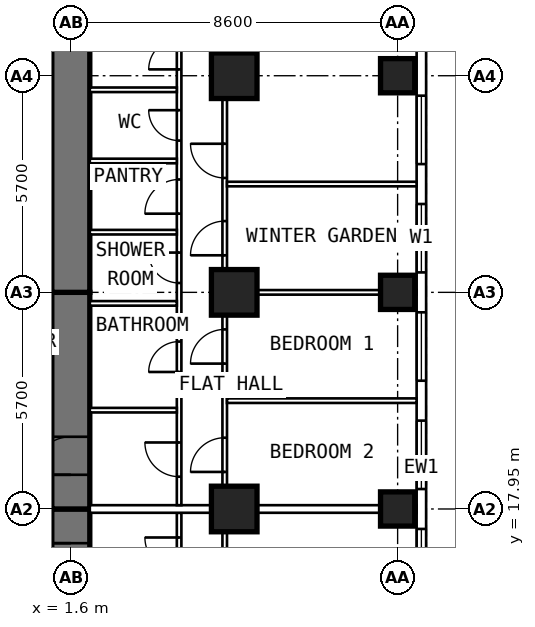
"""IFC4 building model, lengths in metres.
Left out: names, types, materials, properties, quantities, classifications, styles, units other than length and angle.
Written with IfcOpenShell. Run it as: python <this file> out.ifc"""

import sys

from ifc_helpers import new_model, si_unit, direction, frame, frame_2d, origin, origin_2d, place, context, subcontext, project, spatial, rectangle, extrude, element, fill, save


model = new_model("IFC4")
c1 = context("Model", 3, precision=1e-05, world=origin(), true_north=direction((0.0, 1.0)))
c2 = subcontext(c1, "Body", "Model", "MODEL_VIEW")
j1 = project(units=[si_unit("LENGTHUNIT", "METRE"), si_unit("PLANEANGLEUNIT", "RADIAN")], contexts=[c1])
p1 = place(None, origin())
s1 = spatial("IfcSite", under=j1, at=p1, CompositionType="ELEMENT")
p2 = place(p1, origin())
s2 = spatial("IfcBuilding", under=s1, at=p2, CompositionType="ELEMENT")
p3 = place(p2, frame((0.0, 0.0, 102.4)))
s3 = spatial("IfcBuildingStorey", under=s2, at=p3, CompositionType="ELEMENT", Elevation=102.4)
for number, where, z_axis, x_axis in (
    (1, (10.2, 17.95, 0.0), (0.0, 0.0, 1.0), (0.0, 1.0, 0.0)),
    (2, (10.2, 23.65, 0.0), (0.0, 0.0, 1.0), (0.0, 1.0, 0.0)),
    (3, (10.2, 29.35, 0.0), (0.0, 0.0, 1.0), (0.0, 1.0, 0.0)),
):
    element("IfcColumn", number, at=place(p3, frame(where, z_axis=z_axis, x_axis=x_axis)), inside=s3, PredefinedType="COLUMN", context=c2, shape_type="SweptSolid", body=[
        extrude(rectangle(XDim=0.9, YDim=0.9, at=origin_2d()), origin(), (0.0, 0.0, 1.0), 3.6),
    ])
for number, where, z_axis, x_axis in (
    (4, (5.9, 17.95, 0.0), (0.0, 0.0, 1.0), (0.0, 1.0, 0.0)),
    (5, (5.9, 23.65, 0.0), (0.0, 0.0, 1.0), (0.0, 1.0, 0.0)),
    (6, (5.9, 29.35, 0.0), (0.0, 0.0, 1.0), (0.0, 1.0, 0.0)),
):
    element("IfcColumn", number, at=place(p3, frame(where, z_axis=z_axis, x_axis=x_axis)), inside=s3, PredefinedType="COLUMN", context=c2, shape_type="SweptSolid", body=[
        extrude(rectangle(XDim=1.2, YDim=1.2, at=origin_2d()), origin(), (0.0, 0.0, 1.0), 3.6),
    ])
p4 = place(p3, frame((1.6, 9.6, 0.0), z_axis=(0.0, 0.0, 1.0), x_axis=(0.0, 1.0, 0.0)))
e7 = element("IfcWall", 7, at=p4, inside=s3, PredefinedType="SHEAR", context=c2, shape_type="SweptSolid", body=[
    extrude(rectangle(XDim=8.35, YDim=1.0, at=frame_2d((4.175, 0.0))), origin(), (0.0, 0.0, 1.0), 3.6),
])
p5 = place(p4, frame((6.45, 0.0, 0.0)))
e8 = element("IfcOpeningElement", 8, at=p5, cuts=e7, PredefinedType="OPENING", context=c2, shape_type="SweptSolid", body=[
    extrude(rectangle(XDim=1.0, YDim=2.1, at=frame_2d((0.5, 1.05))), frame((0.0, 0.512, 0.0), z_axis=(0.0, -1.0, 0.0), x_axis=(1.0, 0.0, 0.0)), (0.0, 0.0, 1.0), 1.024),
])
p6 = place(p3, frame((1.6, 17.95, 0.0), z_axis=(0.0, 0.0, 1.0), x_axis=(0.0, 1.0, 0.0)))
e9 = element("IfcWall", 9, at=p6, inside=s3, PredefinedType="SHEAR", context=c2, shape_type="SweptSolid", body=[
    extrude(rectangle(XDim=5.7, YDim=1.0, at=frame_2d((2.85, 0.0))), origin(), (0.0, 0.0, 1.0), 3.6),
])
p7 = place(p6, frame((0.9, 0.0, 0.0)))
e10 = element("IfcOpeningElement", 10, at=p7, cuts=e9, PredefinedType="OPENING", context=c2, shape_type="SweptSolid", body=[
    extrude(rectangle(XDim=1.0, YDim=2.1, at=frame_2d((0.5, 1.05))), frame((0.0, 0.512, 0.0), z_axis=(0.0, -1.0, 0.0), x_axis=(1.0, 0.0, 0.0)), (0.0, 0.0, 1.0), 1.024),
])
p8 = place(p3, frame((1.6, 23.65, 0.0), z_axis=(0.0, 0.0, 1.0), x_axis=(0.0, 1.0, 0.0)))
e11 = element("IfcWall", 11, at=p8, inside=s3, PredefinedType="SHEAR", context=c2, shape_type="SweptSolid", body=[
    extrude(rectangle(XDim=10.745, YDim=1.0, at=frame_2d((5.373, 0.0))), origin(), (0.0, 0.0, 1.0), 3.6),
])
p9 = place(p3, frame((10.825, 6.409, 0.0), z_axis=(0.0, 0.0, 1.0), x_axis=(0.0, 1.0, 0.0)))
e12 = element("IfcWall", 12, at=p9, inside=s3, PredefinedType="SOLIDWALL", context=c2, shape_type="SweptSolid", body=[
    extrude(rectangle(XDim=25.226, YDim=0.25, at=frame_2d((12.613, 0.0))), origin(), (0.0, 0.0, 1.0), 3.35),
])
p10 = place(p9, frame((0.666, 0.0, 0.8)))
e13 = element("IfcOpeningElement", 13, at=p10, cuts=e12, PredefinedType="OPENING", context=c2, shape_type="SweptSolid", body=[
    extrude(rectangle(XDim=1.8, YDim=1.8, at=frame_2d((0.9, 0.9))), frame((0.0, 0.137, 0.0), z_axis=(0.0, -1.0, 0.0), x_axis=(1.0, 0.0, 0.0)), (0.0, 0.0, 1.0), 0.274),
])
p11 = place(p9, frame((3.516, 0.0, 0.8)))
e14 = element("IfcOpeningElement", 14, at=p11, cuts=e12, PredefinedType="OPENING", context=c2, shape_type="SweptSolid", body=[
    extrude(rectangle(XDim=1.8, YDim=1.8, at=frame_2d((0.9, 0.9))), frame((0.0, 0.137, 0.0), z_axis=(0.0, -1.0, 0.0), x_axis=(1.0, 0.0, 0.0)), (0.0, 0.0, 1.0), 0.274),
])
p12 = place(p9, frame((6.366, 0.0, 0.8)))
e15 = element("IfcOpeningElement", 15, at=p12, cuts=e12, PredefinedType="OPENING", context=c2, shape_type="SweptSolid", body=[
    extrude(rectangle(XDim=1.8, YDim=1.8, at=frame_2d((0.9, 0.9))), frame((0.0, 0.137, 0.0), z_axis=(0.0, -1.0, 0.0), x_axis=(1.0, 0.0, 0.0)), (0.0, 0.0, 1.0), 0.274),
])
p13 = place(p9, frame((9.216, 0.0, 0.8)))
e16 = element("IfcOpeningElement", 16, at=p13, cuts=e12, PredefinedType="OPENING", context=c2, shape_type="SweptSolid", body=[
    extrude(rectangle(XDim=1.8, YDim=1.8, at=frame_2d((0.9, 0.9))), frame((0.0, 0.137, 0.0), z_axis=(0.0, -1.0, 0.0), x_axis=(1.0, 0.0, 0.0)), (0.0, 0.0, 1.0), 0.274),
])
p14 = place(p9, frame((12.066, 0.0, 0.8)))
e17 = element("IfcOpeningElement", 17, at=p14, cuts=e12, PredefinedType="OPENING", context=c2, shape_type="SweptSolid", body=[
    extrude(rectangle(XDim=1.8, YDim=1.8, at=frame_2d((0.9, 0.9))), frame((0.0, 0.137, 0.0), z_axis=(0.0, -1.0, 0.0), x_axis=(1.0, 0.0, 0.0)), (0.0, 0.0, 1.0), 0.274),
])
p15 = place(p9, frame((14.916, 0.0, 0.8)))
e18 = element("IfcOpeningElement", 18, at=p15, cuts=e12, PredefinedType="OPENING", context=c2, shape_type="SweptSolid", body=[
    extrude(rectangle(XDim=1.8, YDim=1.8, at=frame_2d((0.9, 0.9))), frame((0.0, 0.137, 0.0), z_axis=(0.0, -1.0, 0.0), x_axis=(1.0, 0.0, 0.0)), (0.0, 0.0, 1.0), 0.274),
])
p16 = place(p9, frame((17.766, 0.0, 0.8)))
e19 = element("IfcOpeningElement", 19, at=p16, cuts=e12, PredefinedType="OPENING", context=c2, shape_type="SweptSolid", body=[
    extrude(rectangle(XDim=1.8, YDim=1.8, at=frame_2d((0.9, 0.9))), frame((0.0, 0.137, 0.0), z_axis=(0.0, -1.0, 0.0), x_axis=(1.0, 0.0, 0.0)), (0.0, 0.0, 1.0), 0.274),
])
p17 = place(p9, frame((20.616, 0.0, 0.8)))
e20 = element("IfcOpeningElement", 20, at=p17, cuts=e12, PredefinedType="OPENING", context=c2, shape_type="SweptSolid", body=[
    extrude(rectangle(XDim=1.8, YDim=1.8, at=frame_2d((0.9, 0.9))), frame((0.0, 0.137, 0.0), z_axis=(0.0, -1.0, 0.0), x_axis=(1.0, 0.0, 0.0)), (0.0, 0.0, 1.0), 0.274),
])
p18 = place(p3, frame((4.45, 10.1, 0.0), z_axis=(0.0, 0.0, 1.0), x_axis=(0.0, 1.0, 0.0)))
e21 = element("IfcWall", 21, at=p18, inside=s3, PredefinedType="PARTITIONING", context=c2, shape_type="SweptSolid", body=[
    extrude(rectangle(XDim=7.75, YDim=0.12, at=frame_2d((3.875, 0.0))), origin(), (0.0, 0.0, 1.0), 3.35),
])
p19 = place(p18, frame((0.56, 0.0, 0.0)))
e22 = element("IfcOpeningElement", 22, at=p19, cuts=e21, PredefinedType="OPENING", context=c2, shape_type="SweptSolid", body=[
    extrude(rectangle(XDim=0.9, YDim=2.1, at=frame_2d((0.45, 1.05))), frame((0.0, 0.072, 0.0), z_axis=(0.0, -1.0, 0.0), x_axis=(1.0, 0.0, 0.0)), (0.0, 0.0, 1.0), 0.144),
])
p20 = place(p18, frame((3.385, 0.0, 0.0)))
e23 = element("IfcOpeningElement", 23, at=p20, cuts=e21, PredefinedType="OPENING", context=c2, shape_type="SweptSolid", body=[
    extrude(rectangle(XDim=0.8, YDim=2.1, at=frame_2d((0.4, 1.05))), frame((0.0, 0.072, 0.0), z_axis=(0.0, -1.0, 0.0), x_axis=(1.0, 0.0, 0.0)), (0.0, 0.0, 1.0), 0.144),
])
p21 = place(p18, frame((6.2, 0.0, 0.0)))
e24 = element("IfcOpeningElement", 24, at=p21, cuts=e21, PredefinedType="OPENING", context=c2, shape_type="SweptSolid", body=[
    extrude(rectangle(XDim=0.9, YDim=2.1, at=frame_2d((0.45, 1.05))), frame((0.0, 0.072, 0.0), z_axis=(0.0, -1.0, 0.0), x_axis=(1.0, 0.0, 0.0)), (0.0, 0.0, 1.0), 0.144),
])
p22 = place(p3, frame((5.65, 9.6, 0.0), z_axis=(0.0, 0.0, 1.0), x_axis=(0.0, 1.0, 0.0)))
e25 = element("IfcWall", 25, at=p22, inside=s3, PredefinedType="PARTITIONING", context=c2, shape_type="SweptSolid", body=[
    extrude(rectangle(XDim=8.1, YDim=0.12, at=frame_2d((4.05, 0.0))), origin(), (0.0, 0.0, 1.0), 3.35),
])
p23 = place(p22, frame((5.05, 0.0, 0.0)))
e26 = element("IfcOpeningElement", 26, at=p23, cuts=e25, PredefinedType="OPENING", context=c2, shape_type="SweptSolid", body=[
    extrude(rectangle(XDim=0.9, YDim=2.1, at=frame_2d((0.45, 1.05))), frame((0.0, 0.072, 0.0), z_axis=(0.0, -1.0, 0.0), x_axis=(1.0, 0.0, 0.0)), (0.0, 0.0, 1.0), 0.144),
])
p24 = place(p3, frame((4.45, 18.05, 0.0), z_axis=(0.0, 0.0, 1.0), x_axis=(0.0, 1.0, 0.0)))
e27 = element("IfcWall", 27, at=p24, inside=s3, PredefinedType="PARTITIONING", context=c2, shape_type="SweptSolid", body=[
    extrude(rectangle(XDim=16.345, YDim=0.12, at=frame_2d((8.172, 0.0))), origin(), (0.0, 0.0, 1.0), 3.35),
])
p25 = place(p24, frame((0.75, 0.0, 0.0)))
e28 = element("IfcOpeningElement", 28, at=p25, cuts=e27, PredefinedType="OPENING", context=c2, shape_type="SweptSolid", body=[
    extrude(rectangle(XDim=0.9, YDim=2.1, at=frame_2d((0.45, 1.05))), frame((0.0, 0.072, 0.0), z_axis=(0.0, -1.0, 0.0), x_axis=(1.0, 0.0, 0.0)), (0.0, 0.0, 1.0), 0.144),
])
p26 = place(p24, frame((3.505, 0.0, 0.0)))
e29 = element("IfcOpeningElement", 29, at=p26, cuts=e27, PredefinedType="OPENING", context=c2, shape_type="SweptSolid", body=[
    extrude(rectangle(XDim=0.8, YDim=2.1, at=frame_2d((0.4, 1.05))), frame((0.0, 0.072, 0.0), z_axis=(0.0, -1.0, 0.0), x_axis=(1.0, 0.0, 0.0)), (0.0, 0.0, 1.0), 0.144),
])
p27 = place(p24, frame((5.847, 0.0, 0.0)))
e30 = element("IfcOpeningElement", 30, at=p27, cuts=e27, PredefinedType="OPENING", context=c2, shape_type="SweptSolid", body=[
    extrude(rectangle(XDim=0.8, YDim=2.1, at=frame_2d((0.4, 1.05))), frame((0.0, 0.072, 0.0), z_axis=(0.0, -1.0, 0.0), x_axis=(1.0, 0.0, 0.0)), (0.0, 0.0, 1.0), 0.144),
])
p28 = place(p24, frame((7.67, 0.0, 0.0)))
e31 = element("IfcOpeningElement", 31, at=p28, cuts=e27, PredefinedType="OPENING", context=c2, shape_type="SweptSolid", body=[
    extrude(rectangle(XDim=0.9, YDim=2.1, at=frame_2d((0.45, 1.05))), frame((0.0, 0.072, 0.0), z_axis=(0.0, -1.0, 0.0), x_axis=(1.0, 0.0, 0.0)), (0.0, 0.0, 1.0), 0.144),
])
p29 = place(p24, frame((9.593, 0.0, 0.0)))
e32 = element("IfcOpeningElement", 32, at=p29, cuts=e27, PredefinedType="OPENING", context=c2, shape_type="SweptSolid", body=[
    extrude(rectangle(XDim=0.8, YDim=2.1, at=frame_2d((0.4, 1.05))), frame((0.0, 0.072, 0.0), z_axis=(0.0, -1.0, 0.0), x_axis=(1.0, 0.0, 0.0)), (0.0, 0.0, 1.0), 0.144),
])
p30 = place(p24, frame((11.467, 0.0, 0.0)))
e33 = element("IfcOpeningElement", 33, at=p30, cuts=e27, PredefinedType="OPENING", context=c2, shape_type="SweptSolid", body=[
    extrude(rectangle(XDim=0.8, YDim=2.1, at=frame_2d((0.4, 1.05))), frame((0.0, 0.072, 0.0), z_axis=(0.0, -1.0, 0.0), x_axis=(1.0, 0.0, 0.0)), (0.0, 0.0, 1.0), 0.144),
])
p31 = place(p24, frame((13.29, 0.0, 0.0)))
e34 = element("IfcOpeningElement", 34, at=p31, cuts=e27, PredefinedType="OPENING", context=c2, shape_type="SweptSolid", body=[
    extrude(rectangle(XDim=0.9, YDim=2.1, at=frame_2d((0.45, 1.05))), frame((0.0, 0.072, 0.0), z_axis=(0.0, -1.0, 0.0), x_axis=(1.0, 0.0, 0.0)), (0.0, 0.0, 1.0), 0.144),
])
p32 = place(p24, frame((14.837, 0.0, 0.0)))
e35 = element("IfcOpeningElement", 35, at=p32, cuts=e27, PredefinedType="OPENING", context=c2, shape_type="SweptSolid", body=[
    extrude(rectangle(XDim=0.9, YDim=2.1, at=frame_2d((0.45, 1.05))), frame((0.0, 0.072, 0.0), z_axis=(0.0, -1.0, 0.0), x_axis=(1.0, 0.0, 0.0)), (0.0, 0.0, 1.0), 0.144),
])
p33 = place(p3, frame((5.65, 18.05, 0.0), z_axis=(0.0, 0.0, 1.0), x_axis=(0.0, 1.0, 0.0)))
e36 = element("IfcWall", 36, at=p33, inside=s3, PredefinedType="PARTITIONING", context=c2, shape_type="SweptSolid", body=[
    extrude(rectangle(XDim=16.345, YDim=0.12, at=frame_2d((8.172, 0.0))), origin(), (0.0, 0.0, 1.0), 3.35),
])
p34 = place(p33, frame((0.875, 0.0, 0.0)))
e37 = element("IfcOpeningElement", 37, at=p34, cuts=e36, PredefinedType="OPENING", context=c2, shape_type="SweptSolid", body=[
    extrude(rectangle(XDim=0.9, YDim=2.1, at=frame_2d((0.45, 1.05))), frame((0.0, 0.072, 0.0), z_axis=(0.0, -1.0, 0.0), x_axis=(1.0, 0.0, 0.0)), (0.0, 0.0, 1.0), 0.144),
])
p35 = place(p33, frame((3.725, 0.0, 0.0)))
e38 = element("IfcOpeningElement", 38, at=p35, cuts=e36, PredefinedType="OPENING", context=c2, shape_type="SweptSolid", body=[
    extrude(rectangle(XDim=0.9, YDim=2.1, at=frame_2d((0.45, 1.05))), frame((0.0, 0.072, 0.0), z_axis=(0.0, -1.0, 0.0), x_axis=(1.0, 0.0, 0.0)), (0.0, 0.0, 1.0), 0.144),
])
p36 = place(p33, frame((6.575, 0.0, 0.0)))
e39 = element("IfcOpeningElement", 39, at=p36, cuts=e36, PredefinedType="OPENING", context=c2, shape_type="SweptSolid", body=[
    extrude(rectangle(XDim=0.9, YDim=2.1, at=frame_2d((0.45, 1.05))), frame((0.0, 0.072, 0.0), z_axis=(0.0, -1.0, 0.0), x_axis=(1.0, 0.0, 0.0)), (0.0, 0.0, 1.0), 0.144),
])
p37 = place(p33, frame((8.61, 0.0, 0.0)))
e40 = element("IfcOpeningElement", 40, at=p37, cuts=e36, PredefinedType="OPENING", context=c2, shape_type="SweptSolid", body=[
    extrude(rectangle(XDim=0.9, YDim=2.1, at=frame_2d((0.45, 1.05))), frame((0.0, 0.072, 0.0), z_axis=(0.0, -1.0, 0.0), x_axis=(1.0, 0.0, 0.0)), (0.0, 0.0, 1.0), 0.144),
])
p38 = place(p3, frame((5.71, 20.8, 0.0), z_axis=(0.0, 0.0, 1.0), x_axis=(1.0, 0.0, 0.0)))
e41 = element("IfcWall", 41, at=p38, inside=s3, PredefinedType="PARTITIONING", context=c2, shape_type="SweptSolid", body=[
    extrude(rectangle(XDim=4.99, YDim=0.12, at=frame_2d((2.495, 0.0))), origin(), (0.0, 0.0, 1.0), 3.35),
])
p39 = place(p3, frame((5.71, 23.65, 0.0), z_axis=(0.0, 0.0, 1.0), x_axis=(1.0, 0.0, 0.0)))
e42 = element("IfcWall", 42, at=p39, inside=s3, PredefinedType="PARTITIONING", context=c2, shape_type="SweptSolid", body=[
    extrude(rectangle(XDim=4.99, YDim=0.12, at=frame_2d((2.495, 0.0))), origin(), (0.0, 0.0, 1.0), 2.45),
])
p40 = place(p3, frame((5.71, 26.5, 0.0), z_axis=(0.0, 0.0, 1.0), x_axis=(1.0, 0.0, 0.0)))
e43 = element("IfcWall", 43, at=p40, inside=s3, PredefinedType="PARTITIONING", context=c2, shape_type="SweptSolid", body=[
    extrude(rectangle(XDim=4.99, YDim=0.12, at=frame_2d((2.495, 0.0))), origin(), (0.0, 0.0, 1.0), 3.35),
])
p41 = place(p3, frame((2.1, 20.55, 0.0), z_axis=(0.0, 0.0, 1.0), x_axis=(1.0, 0.0, 0.0)))
e44 = element("IfcWall", 44, at=p41, inside=s3, PredefinedType="PARTITIONING", context=c2, shape_type="SweptSolid", body=[
    extrude(rectangle(XDim=2.29, YDim=0.12, at=frame_2d((1.145, 0.0))), origin(), (0.0, 0.0, 1.0), 3.35),
])
p42 = place(p3, frame((2.1, 23.36, 0.0), z_axis=(0.0, 0.0, 1.0), x_axis=(1.0, 0.0, 0.0)))
e45 = element("IfcWall", 45, at=p42, inside=s3, PredefinedType="PARTITIONING", context=c2, shape_type="SweptSolid", body=[
    extrude(rectangle(XDim=2.29, YDim=0.12, at=frame_2d((1.145, 0.0))), origin(), (0.0, 0.0, 1.0), 2.45),
])
for number, where, z_axis, x_axis in (
    (46, (2.1, 25.233, 0.0), (0.0, 0.0, 1.0), (1.0, 0.0, 0.0)),
    (47, (2.1, 27.107, 0.0), (0.0, 0.0, 1.0), (1.0, 0.0, 0.0)),
):
    element("IfcWall", number, at=place(p3, frame(where, z_axis=z_axis, x_axis=x_axis)), inside=s3, PredefinedType="PARTITIONING", context=c2, shape_type="SweptSolid", body=[
        extrude(rectangle(XDim=2.29, YDim=0.12, at=frame_2d((1.145, 0.0))), origin(), (0.0, 0.0, 1.0), 3.35),
    ])
p43 = place(p3, frame((2.1, 28.98, 0.0), z_axis=(0.0, 0.0, 1.0), x_axis=(1.0, 0.0, 0.0)))
e48 = element("IfcWall", 48, at=p43, inside=s3, PredefinedType="PARTITIONING", context=c2, shape_type="SweptSolid", body=[
    extrude(rectangle(XDim=2.29, YDim=0.12, at=frame_2d((1.145, 0.0))), origin(), (0.0, 0.0, 1.0), 2.45),
])
p44 = place(p3, frame((2.1, 17.95, 0.0), z_axis=(0.0, 0.0, 1.0), x_axis=(1.0, 0.0, 0.0)))
e49 = element("IfcWall", 49, at=p44, inside=s3, PredefinedType="PARTITIONING", context=c2, shape_type="SweptSolid", body=[
    extrude(rectangle(XDim=8.6, YDim=0.2, at=frame_2d((4.3, 0.0))), origin(), (0.0, 0.0, 1.0), 2.45),
])
p45 = place(p13, origin())
e50 = element("IfcWindow", 50, at=p45, inside=s3, PartitioningType="SINGLE_PANEL", PredefinedType="WINDOW", context=c2, shape_type="SweptSolid", body=[
    extrude(rectangle(XDim=1.8, YDim=1.8, at=frame_2d((0.9, 0.9))), frame((0.0, 0.03, 0.0), z_axis=(0.0, -1.0, 0.0), x_axis=(1.0, 0.0, 0.0)), (0.0, 0.0, 1.0), 0.06),
])
fill(e16, e50)
p46 = place(p14, origin())
e51 = element("IfcWindow", 51, at=p46, inside=s3, PartitioningType="SINGLE_PANEL", PredefinedType="WINDOW", context=c2, shape_type="SweptSolid", body=[
    extrude(rectangle(XDim=1.8, YDim=1.8, at=frame_2d((0.9, 0.9))), frame((0.0, 0.03, 0.0), z_axis=(0.0, -1.0, 0.0), x_axis=(1.0, 0.0, 0.0)), (0.0, 0.0, 1.0), 0.06),
])
fill(e17, e51)
p47 = place(p15, origin())
e52 = element("IfcWindow", 52, at=p47, inside=s3, PartitioningType="SINGLE_PANEL", PredefinedType="WINDOW", context=c2, shape_type="SweptSolid", body=[
    extrude(rectangle(XDim=1.8, YDim=1.8, at=frame_2d((0.9, 0.9))), frame((0.0, 0.03, 0.0), z_axis=(0.0, -1.0, 0.0), x_axis=(1.0, 0.0, 0.0)), (0.0, 0.0, 1.0), 0.06),
])
fill(e18, e52)
p48 = place(p16, origin())
e53 = element("IfcWindow", 53, at=p48, inside=s3, PartitioningType="SINGLE_PANEL", PredefinedType="WINDOW", context=c2, shape_type="SweptSolid", body=[
    extrude(rectangle(XDim=1.8, YDim=1.8, at=frame_2d((0.9, 0.9))), frame((0.0, 0.03, 0.0), z_axis=(0.0, -1.0, 0.0), x_axis=(1.0, 0.0, 0.0)), (0.0, 0.0, 1.0), 0.06),
])
fill(e19, e53)
p49 = place(p17, origin())
e54 = element("IfcWindow", 54, at=p49, inside=s3, PartitioningType="SINGLE_PANEL", PredefinedType="WINDOW", context=c2, shape_type="SweptSolid", body=[
    extrude(rectangle(XDim=1.8, YDim=1.8, at=frame_2d((0.9, 0.9))), frame((0.0, 0.03, 0.0), z_axis=(0.0, -1.0, 0.0), x_axis=(1.0, 0.0, 0.0)), (0.0, 0.0, 1.0), 0.06),
])
fill(e20, e54)
p50 = place(p5, origin())
e55 = element("IfcDoor", 55, at=p50, inside=s3, OperationType="SINGLE_SWING_RIGHT", PredefinedType="DOOR", context=c2, shape_type="SweptSolid", body=[
    extrude(rectangle(XDim=1.0, YDim=2.1, at=frame_2d((0.5, 1.05))), frame((0.0, 0.25, 0.0), z_axis=(0.0, -1.0, 0.0), x_axis=(1.0, 0.0, 0.0)), (0.0, 0.0, 1.0), 0.5),
])
fill(e8, e55)
p51 = place(p21, origin())
e56 = element("IfcDoor", 56, at=p51, inside=s3, OperationType="SINGLE_SWING_RIGHT", PredefinedType="DOOR", context=c2, shape_type="SweptSolid", body=[
    extrude(rectangle(XDim=0.9, YDim=2.1, at=frame_2d((0.45, 1.05))), frame((0.0, 0.025, 0.0), z_axis=(0.0, -1.0, 0.0), x_axis=(1.0, 0.0, 0.0)), (0.0, 0.0, 1.0), 0.05),
])
fill(e24, e56)
p52 = place(p7, origin())
e57 = element("IfcDoor", 57, at=p52, inside=s3, OperationType="SINGLE_SWING_LEFT", PredefinedType="DOOR", context=c2, shape_type="SweptSolid", body=[
    extrude(rectangle(XDim=1.0, YDim=2.1, at=frame_2d((0.5, 1.05))), frame((0.0, 0.25, 0.0), z_axis=(0.0, -1.0, 0.0), x_axis=(1.0, 0.0, 0.0)), (0.0, 0.0, 1.0), 0.5),
])
fill(e10, e57)
p53 = place(p34, origin())
e58 = element("IfcDoor", 58, at=p53, inside=s3, OperationType="SINGLE_SWING_LEFT", PredefinedType="DOOR", context=c2, shape_type="SweptSolid", body=[
    extrude(rectangle(XDim=0.9, YDim=2.1, at=frame_2d((0.45, 1.05))), frame((0.0, 0.025, 0.0), z_axis=(0.0, -1.0, 0.0), x_axis=(1.0, 0.0, 0.0)), (0.0, 0.0, 1.0), 0.05),
])
fill(e37, e58)
p54 = place(p35, origin())
e59 = element("IfcDoor", 59, at=p54, inside=s3, OperationType="SINGLE_SWING_LEFT", PredefinedType="DOOR", context=c2, shape_type="SweptSolid", body=[
    extrude(rectangle(XDim=0.9, YDim=2.1, at=frame_2d((0.45, 1.05))), frame((0.0, 0.025, 0.0), z_axis=(0.0, -1.0, 0.0), x_axis=(1.0, 0.0, 0.0)), (0.0, 0.0, 1.0), 0.05),
])
fill(e38, e59)
p55 = place(p36, origin())
e60 = element("IfcDoor", 60, at=p55, inside=s3, OperationType="SINGLE_SWING_LEFT", PredefinedType="DOOR", context=c2, shape_type="SweptSolid", body=[
    extrude(rectangle(XDim=0.9, YDim=2.1, at=frame_2d((0.45, 1.05))), frame((0.0, 0.025, 0.0), z_axis=(0.0, -1.0, 0.0), x_axis=(1.0, 0.0, 0.0)), (0.0, 0.0, 1.0), 0.05),
])
fill(e39, e60)
p56 = place(p37, origin())
e61 = element("IfcDoor", 61, at=p56, inside=s3, OperationType="SINGLE_SWING_RIGHT", PredefinedType="DOOR", context=c2, shape_type="SweptSolid", body=[
    extrude(rectangle(XDim=0.9, YDim=2.1, at=frame_2d((0.45, 1.05))), frame((0.0, 0.025, 0.0), z_axis=(0.0, -1.0, 0.0), x_axis=(1.0, 0.0, 0.0)), (0.0, 0.0, 1.0), 0.05),
])
fill(e40, e61)
p57 = place(p25, origin())
e62 = element("IfcDoor", 62, at=p57, inside=s3, OperationType="SINGLE_SWING_RIGHT", PredefinedType="DOOR", context=c2, shape_type="SweptSolid", body=[
    extrude(rectangle(XDim=0.9, YDim=2.1, at=frame_2d((0.45, 1.05))), frame((0.0, 0.025, 0.0), z_axis=(0.0, -1.0, 0.0), x_axis=(1.0, 0.0, 0.0)), (0.0, 0.0, 1.0), 0.05),
])
fill(e28, e62)
p58 = place(p26, origin())
e63 = element("IfcDoor", 63, at=p58, inside=s3, OperationType="SINGLE_SWING_LEFT", PredefinedType="DOOR", context=c2, shape_type="SweptSolid", body=[
    extrude(rectangle(XDim=0.8, YDim=2.1, at=frame_2d((0.4, 1.05))), frame((0.0, 0.025, 0.0), z_axis=(0.0, -1.0, 0.0), x_axis=(1.0, 0.0, 0.0)), (0.0, 0.0, 1.0), 0.05),
])
fill(e29, e63)
p59 = place(p27, origin())
e64 = element("IfcDoor", 64, at=p59, inside=s3, OperationType="SINGLE_SWING_RIGHT", PredefinedType="DOOR", context=c2, shape_type="SweptSolid", body=[
    extrude(rectangle(XDim=0.8, YDim=2.1, at=frame_2d((0.4, 1.05))), frame((0.0, 0.025, 0.0), z_axis=(0.0, -1.0, 0.0), x_axis=(1.0, 0.0, 0.0)), (0.0, 0.0, 1.0), 0.05),
])
fill(e30, e64)
p60 = place(p28, origin())
e65 = element("IfcDoor", 65, at=p60, inside=s3, OperationType="SINGLE_SWING_LEFT", PredefinedType="DOOR", context=c2, shape_type="SweptSolid", body=[
    extrude(rectangle(XDim=0.9, YDim=2.1, at=frame_2d((0.45, 1.05))), frame((0.0, 0.025, 0.0), z_axis=(0.0, -1.0, 0.0), x_axis=(1.0, 0.0, 0.0)), (0.0, 0.0, 1.0), 0.05),
])
fill(e31, e65)
p61 = place(p29, origin())
e66 = element("IfcDoor", 66, at=p61, inside=s3, OperationType="SINGLE_SWING_RIGHT", PredefinedType="DOOR", context=c2, shape_type="SweptSolid", body=[
    extrude(rectangle(XDim=0.8, YDim=2.1, at=frame_2d((0.4, 1.05))), frame((0.0, 0.025, 0.0), z_axis=(0.0, -1.0, 0.0), x_axis=(1.0, 0.0, 0.0)), (0.0, 0.0, 1.0), 0.05),
])
fill(e32, e66)
p62 = place(p30, origin())
e67 = element("IfcDoor", 67, at=p62, inside=s3, OperationType="SINGLE_SWING_LEFT", PredefinedType="DOOR", context=c2, shape_type="SweptSolid", body=[
    extrude(rectangle(XDim=0.8, YDim=2.1, at=frame_2d((0.4, 1.05))), frame((0.0, 0.025, 0.0), z_axis=(0.0, -1.0, 0.0), x_axis=(1.0, 0.0, 0.0)), (0.0, 0.0, 1.0), 0.05),
])
fill(e33, e67)
save(model, sys.argv[1])
